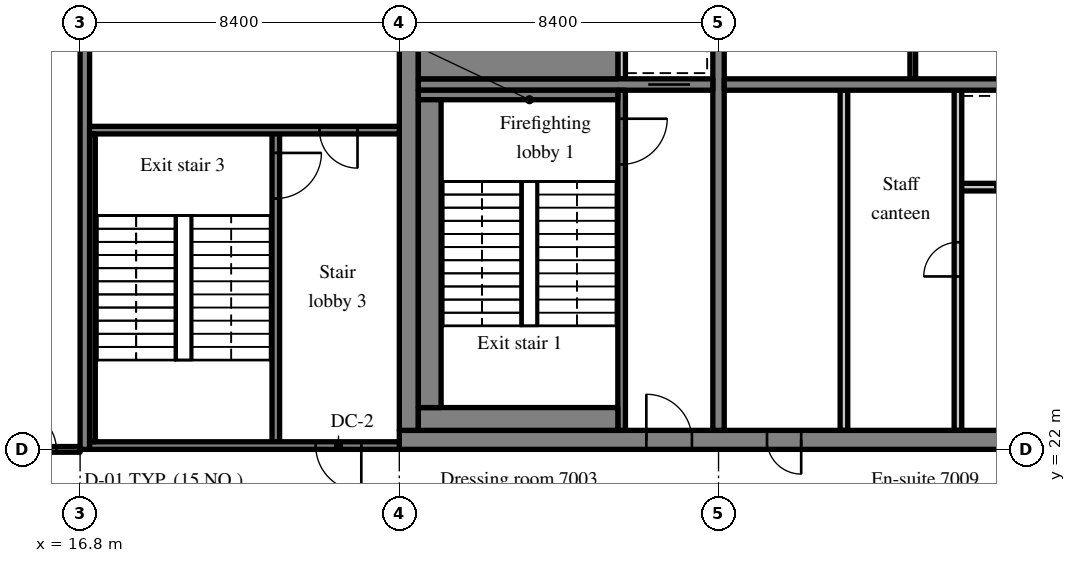
"""IFC4 building model, lengths in metres.
Left out: names, types, materials, properties, quantities, classifications, styles, units other than length and angle.
Written with IfcOpenShell. Run it as: python <this file> out.ifc"""

import sys

from ifc_helpers import new_model, si_unit, direction, frame, frame_2d, origin, place, context, subcontext, project, spatial, rectangle, extrude, source, transform, mapped, element, fill, save


model = new_model("IFC4")
c1 = context("Model", 3, precision=1e-05, world=origin(), true_north=direction((0.0, 1.0)))
c2 = subcontext(c1, "Body", "Model", "MODEL_VIEW")
j1 = project(units=[si_unit("LENGTHUNIT", "METRE"), si_unit("PLANEANGLEUNIT", "RADIAN")], contexts=[c1])
p1 = place(None, origin())
s1 = spatial("IfcSite", under=j1, at=p1, CompositionType="ELEMENT")
p2 = place(p1, origin())
s2 = spatial("IfcBuilding", under=s1, at=p2, CompositionType="ELEMENT")
p3 = place(p2, frame((0.0, 0.0, 293.7)))
s3 = spatial("IfcBuildingStorey", under=s2, at=p3, CompositionType="ELEMENT", Elevation=293.7)
m1 = source(origin(), c2, "Body", "SweptSolid", [
    extrude(rectangle(XDim=50.4, YDim=0.5, at=frame_2d((25.2, 0.0))), origin(), (0.0, 0.0, 1.0), 3.72),
])
p4 = place(p3, frame((25.2, 22.25, 0.0), z_axis=(0.0, 0.0, 1.0), x_axis=(1.0, 0.0, 0.0)))
e1 = element("IfcWall", 1, at=p4, inside=s3, PredefinedType="SHEAR", context=c2, shape_type="MappedRepresentation", body=[
    mapped(m1, transform((0.0, 0.0, 0.0), scale=1.0)),
])
m2 = source(origin(), c2, "Body", "SweptSolid", [
    extrude(rectangle(XDim=1.8, YDim=2.1, at=frame_2d((0.9, 1.05))), frame((0.0, 0.26, 0.0), z_axis=(0.0, -1.0, 0.0), x_axis=(1.0, 0.0, 0.0)), (0.0, 0.0, 1.0), 0.52),
])
p5 = place(p4, frame((15.9, 0.0, 0.0)))
e2 = element("IfcOpeningElement", 2, at=p5, cuts=e1, PredefinedType="OPENING", context=c2, shape_type="MappedRepresentation", body=[
    mapped(m2, transform((0.0, 0.0, 0.0), scale=1.0)),
])
m3 = source(origin(), c2, "Body", "SweptSolid", [
    extrude(rectangle(XDim=0.9, YDim=2.1, at=frame_2d((0.45, 1.05))), frame((0.0, 0.26, 0.0), z_axis=(0.0, -1.0, 0.0), x_axis=(1.0, 0.0, 0.0)), (0.0, 0.0, 1.0), 0.52),
])
p6 = place(p4, frame((9.675, 0.0, 0.0)))
e3 = element("IfcOpeningElement", 3, at=p6, cuts=e1, PredefinedType="OPENING", context=c2, shape_type="MappedRepresentation", body=[
    mapped(m3, transform((0.0, 0.0, 0.0), scale=1.0)),
])
p7 = place(p4, frame((21.525, 0.0, 0.0)))
e4 = element("IfcOpeningElement", 4, at=p7, cuts=e1, PredefinedType="OPENING", context=c2, shape_type="MappedRepresentation", body=[
    mapped(m3, transform((0.0, 0.0, 0.0), scale=1.0)),
])
p8 = place(p4, frame((32.7, 0.0, 0.0)))
e5 = element("IfcOpeningElement", 5, at=p8, cuts=e1, PredefinedType="OPENING", context=c2, shape_type="MappedRepresentation", body=[
    mapped(m2, transform((0.0, 0.0, 0.0), scale=1.0)),
])
m4 = source(origin(), c2, "Body", "SweptSolid", [
    extrude(rectangle(XDim=1.2, YDim=2.1, at=frame_2d((0.6, 1.05))), frame((0.0, 0.26, 0.0), z_axis=(0.0, -1.0, 0.0), x_axis=(1.0, 0.0, 0.0)), (0.0, 0.0, 1.0), 0.52),
])
p9 = place(p4, frame((6.5, 0.0, 0.0)))
e6 = element("IfcOpeningElement", 6, at=p9, cuts=e1, PredefinedType="OPENING", context=c2, shape_type="MappedRepresentation", body=[
    mapped(m4, transform((0.0, 0.0, 0.0), scale=1.0)),
])
p10 = place(p4, frame((47.975, 0.0, 0.0)))
e7 = element("IfcOpeningElement", 7, at=p10, cuts=e1, PredefinedType="OPENING", context=c2, shape_type="MappedRepresentation", body=[
    mapped(m4, transform((0.0, 0.0, 0.0), scale=1.0)),
])
m5 = source(origin(), c2, "Body", "SweptSolid", [
    extrude(rectangle(XDim=19.0, YDim=0.5, at=frame_2d((9.5, 0.0))), origin(), (0.0, 0.0, 1.0), 3.72),
])
p11 = place(p3, frame((25.45, 22.5, 0.0), z_axis=(0.0, 0.0, 1.0), x_axis=(0.0, 1.0, 0.0)))
e8 = element("IfcWall", 8, at=p11, inside=s3, PredefinedType="SHEAR", context=c2, shape_type="MappedRepresentation", body=[
    mapped(m5, transform((0.0, 0.0, 0.0), scale=1.0)),
])
m6 = source(origin(), c2, "Body", "SweptSolid", [
    extrude(rectangle(XDim=19.0, YDim=0.3, at=frame_2d((9.5, 0.0))), origin(), (0.0, 0.0, 1.0), 3.72),
])
p12 = place(p3, frame((33.6, 22.5, 0.0), z_axis=(0.0, 0.0, 1.0), x_axis=(0.0, 1.0, 0.0)))
e9 = element("IfcWall", 9, at=p12, inside=s3, PredefinedType="SHEAR", context=c2, shape_type="MappedRepresentation", body=[
    mapped(m6, transform((0.0, 0.0, 0.0), scale=1.0)),
])
m7 = source(origin(), c2, "Body", "SweptSolid", [
    extrude(rectangle(XDim=1.1, YDim=2.1, at=frame_2d((0.55, 1.05))), frame((0.0, 0.16, 0.0), z_axis=(0.0, -1.0, 0.0), x_axis=(1.0, 0.0, 0.0)), (0.0, 0.0, 1.0), 0.32),
])
p13 = place(p12, frame((12.95, 0.0, 0.0)))
e10 = element("IfcOpeningElement", 10, at=p13, cuts=e9, PredefinedType="OPENING", context=c2, shape_type="MappedRepresentation", body=[
    mapped(m7, transform((0.0, 0.0, 0.0), scale=1.0)),
])
m8 = source(origin(), c2, "Body", "SweptSolid", [
    extrude(rectangle(XDim=7.75, YDim=0.3, at=frame_2d((3.875, 0.0))), origin(), (0.0, 0.0, 1.0), 3.72),
])
p14 = place(p3, frame((25.7, 31.6, 0.0), z_axis=(0.0, 0.0, 1.0), x_axis=(1.0, 0.0, 0.0)))
e11 = element("IfcWall", 11, at=p14, inside=s3, PredefinedType="SHEAR", context=c2, shape_type="MappedRepresentation", body=[
    mapped(m8, transform((0.0, 0.0, 0.0), scale=1.0)),
])
p15 = place(p14, frame((6.05, 0.0, 0.0)))
e12 = element("IfcOpeningElement", 12, at=p15, cuts=e11, PredefinedType="OPENING", context=c2, shape_type="MappedRepresentation", body=[
    mapped(m7, transform((0.0, 0.0, 0.0), scale=1.0)),
])
m9 = source(origin(), c2, "Body", "SweptSolid", [
    extrude(rectangle(XDim=16.5, YDim=0.3, at=frame_2d((8.25, 0.0))), origin(), (0.0, 0.0, 1.0), 3.72),
])
p16 = place(p3, frame((33.75, 31.6, 0.0), z_axis=(0.0, 0.0, 1.0), x_axis=(1.0, 0.0, 0.0)))
e13 = element("IfcWall", 13, at=p16, inside=s3, PredefinedType="SHEAR", context=c2, shape_type="MappedRepresentation", body=[
    mapped(m9, transform((0.0, 0.0, 0.0), scale=1.0)),
])
m10 = source(origin(), c2, "Body", "SweptSolid", [
    extrude(rectangle(XDim=1.0, YDim=2.1, at=frame_2d((0.5, 1.05))), frame((0.0, 0.16, 0.0), z_axis=(0.0, -1.0, 0.0), x_axis=(1.0, 0.0, 0.0)), (0.0, 0.0, 1.0), 0.32),
])
p17 = place(p16, frame((14.875, 0.0, 0.0)))
e14 = element("IfcOpeningElement", 14, at=p17, cuts=e13, PredefinedType="OPENING", context=c2, shape_type="MappedRepresentation", body=[
    mapped(m10, transform((0.0, 0.0, 0.0), scale=1.0)),
])
m11 = source(origin(), c2, "Body", "SweptSolid", [
    extrude(rectangle(XDim=18.4, YDim=0.25, at=frame_2d((9.2, 0.0))), origin(), (0.0, 0.0, 1.0), 3.72),
])
p18 = place(p3, frame((16.925, 22.0, 0.0), z_axis=(0.0, 0.0, 1.0), x_axis=(0.0, 1.0, 0.0)))
e15 = element("IfcWall", 15, at=p18, inside=s3, PredefinedType="SHEAR", context=c2, shape_type="MappedRepresentation", body=[
    mapped(m11, transform((0.0, 0.0, 0.0), scale=1.0)),
])
m12 = source(origin(), c2, "Body", "SweptSolid", [
    extrude(rectangle(XDim=6.0, YDim=0.2, at=frame_2d((3.0, 0.0))), origin(), (0.0, 0.0, 1.0), 3.72),
])
p19 = place(p3, frame((39.9, 28.9, 0.0), z_axis=(0.0, 0.0, 1.0), x_axis=(1.0, 0.0, 0.0)))
e16 = element("IfcWall", 16, at=p19, inside=s3, PredefinedType="SOLIDWALL", context=c2, shape_type="MappedRepresentation", body=[
    mapped(m12, transform((0.0, 0.0, 0.0), scale=1.0)),
])
m13 = source(origin(), c2, "Body", "SweptSolid", [
    extrude(rectangle(XDim=1.1, YDim=2.1, at=frame_2d((0.55, 1.05))), frame((0.0, 0.11, 0.0), z_axis=(0.0, -1.0, 0.0), x_axis=(1.0, 0.0, 0.0)), (0.0, 0.0, 1.0), 0.22),
])
p20 = place(p19, frame((0.95, 0.0, 0.0)))
e17 = element("IfcOpeningElement", 17, at=p20, cuts=e16, PredefinedType="OPENING", context=c2, shape_type="MappedRepresentation", body=[
    mapped(m13, transform((0.0, 0.0, 0.0), scale=1.0)),
])
p21 = place(p19, frame((3.95, 0.0, 0.0)))
e18 = element("IfcOpeningElement", 18, at=p21, cuts=e16, PredefinedType="OPENING", context=c2, shape_type="MappedRepresentation", body=[
    mapped(m13, transform((0.0, 0.0, 0.0), scale=1.0)),
])
m14 = source(origin(), c2, "Body", "SweptSolid", [
    extrude(rectangle(XDim=8.95, YDim=0.2, at=frame_2d((4.475, 0.0))), origin(), (0.0, 0.0, 1.0), 3.72),
])
p22 = place(p3, frame((39.9, 22.5, 0.0), z_axis=(0.0, 0.0, 1.0), x_axis=(0.0, 1.0, 0.0)))
e19 = element("IfcWall", 19, at=p22, inside=s3, PredefinedType="PARTITIONING", context=c2, shape_type="MappedRepresentation", body=[
    mapped(m14, transform((0.0, 0.0, 0.0), scale=1.0)),
])
m15 = source(origin(), c2, "Body", "SweptSolid", [
    extrude(rectangle(XDim=0.9, YDim=2.1, at=frame_2d((0.45, 1.05))), frame((0.0, 0.11, 0.0), z_axis=(0.0, -1.0, 0.0), x_axis=(1.0, 0.0, 0.0)), (0.0, 0.0, 1.0), 0.22),
])
p23 = place(p22, frame((4.05, 0.0, 0.0)))
e20 = element("IfcOpeningElement", 20, at=p23, cuts=e19, PredefinedType="OPENING", context=c2, shape_type="MappedRepresentation", body=[
    mapped(m15, transform((0.0, 0.0, 0.0), scale=1.0)),
])
p24 = place(p3, frame((36.9, 22.5, 0.0), z_axis=(0.0, 0.0, 1.0), x_axis=(0.0, 1.0, 0.0)))
e21 = element("IfcWall", 21, at=p24, inside=s3, PredefinedType="PARTITIONING", context=c2, shape_type="MappedRepresentation", body=[
    mapped(m14, transform((0.0, 0.0, 0.0), scale=1.0)),
])
m16 = source(origin(), c2, "Body", "SweptSolid", [
    extrude(rectangle(XDim=3.25, YDim=0.15, at=frame_2d((1.625, 0.0))), origin(), (0.0, 0.0, 1.0), 3.72),
])
p25 = place(p3, frame((38.711, 31.75, 0.0), z_axis=(0.0, 0.0, 1.0), x_axis=(0.0, 1.0, 0.0)))
e22 = element("IfcWall", 22, at=p25, inside=s3, PredefinedType="PARTITIONING", context=c2, shape_type="MappedRepresentation", body=[
    mapped(m16, transform((0.0, 0.0, 0.0), scale=1.0)),
])
m17 = source(origin(), c2, "Body", "SweptSolid", [
    extrude(rectangle(XDim=8.95, YDim=0.2, at=frame_2d((4.475, 0.0))), origin(), (0.0, 0.0, 1.0), 3.72),
])
p26 = place(p3, frame((31.05, 22.5, 0.0), z_axis=(0.0, 0.0, 1.0), x_axis=(0.0, 1.0, 0.0)))
e23 = element("IfcWall", 23, at=p26, inside=s3, PredefinedType="SOLIDWALL", context=c2, shape_type="MappedRepresentation", body=[
    mapped(m17, transform((0.0, 0.0, 0.0), scale=1.0)),
])
m18 = source(origin(), c2, "Body", "SweptSolid", [
    extrude(rectangle(XDim=1.2, YDim=2.1, at=frame_2d((0.6, 1.05))), frame((0.0, 0.11, 0.0), z_axis=(0.0, -1.0, 0.0), x_axis=(1.0, 0.0, 0.0)), (0.0, 0.0, 1.0), 0.22),
])
p27 = place(p26, frame((7.0, 0.0, 0.0)))
e24 = element("IfcOpeningElement", 24, at=p27, cuts=e23, PredefinedType="OPENING", context=c2, shape_type="MappedRepresentation", body=[
    mapped(m18, transform((0.0, 0.0, 0.0), scale=1.0)),
])
m19 = source(origin(), c2, "Body", "SweptSolid", [
    extrude(rectangle(XDim=1.85, YDim=0.2, at=frame_2d((0.925, 0.0))), origin(), (0.0, 0.0, 1.0), 3.72),
])
p28 = place(p3, frame((31.05, 31.75, 0.0), z_axis=(0.0, 0.0, 1.0), x_axis=(0.0, 1.0, 0.0)))
e25 = element("IfcWall", 25, at=p28, inside=s3, PredefinedType="SOLIDWALL", context=c2, shape_type="MappedRepresentation", body=[
    mapped(m19, transform((0.0, 0.0, 0.0), scale=1.0)),
])
m20 = source(origin(), c2, "Body", "SweptSolid", [
    extrude(rectangle(XDim=8.3, YDim=0.2, at=frame_2d((4.15, 0.0))), origin(), (0.0, 0.0, 1.0), 3.72),
])
p29 = place(p3, frame((21.95, 22.1, 0.0), z_axis=(0.0, 0.0, 1.0), x_axis=(0.0, 1.0, 0.0)))
e26 = element("IfcWall", 26, at=p29, inside=s3, PredefinedType="SOLIDWALL", context=c2, shape_type="MappedRepresentation", body=[
    mapped(m20, transform((0.0, 0.0, 0.0), scale=1.0)),
])
p30 = place(p29, frame((6.5, 0.0, 0.0)))
e27 = element("IfcOpeningElement", 27, at=p30, cuts=e26, PredefinedType="OPENING", context=c2, shape_type="MappedRepresentation", body=[
    mapped(m18, transform((0.0, 0.0, 0.0), scale=1.0)),
])
m21 = source(origin(), c2, "Body", "SweptSolid", [
    extrude(rectangle(XDim=8.15, YDim=0.2, at=frame_2d((4.075, 0.0))), origin(), (0.0, 0.0, 1.0), 3.72),
])
p31 = place(p3, frame((17.05, 22.1, 0.0), z_axis=(0.0, 0.0, 1.0), x_axis=(1.0, 0.0, 0.0)))
e28 = element("IfcWall", 28, at=p31, inside=s3, PredefinedType="SOLIDWALL", context=c2, shape_type="MappedRepresentation", body=[
    mapped(m21, transform((0.0, 0.0, 0.0), scale=1.0)),
])
p32 = place(p31, frame((5.95, 0.0, 0.0)))
e29 = element("IfcOpeningElement", 29, at=p32, cuts=e28, PredefinedType="OPENING", context=c2, shape_type="MappedRepresentation", body=[
    mapped(m18, transform((0.0, 0.0, 0.0), scale=1.0)),
])
p33 = place(p3, frame((17.05, 30.4, 0.0), z_axis=(0.0, 0.0, 1.0), x_axis=(1.0, 0.0, 0.0)))
e30 = element("IfcWall", 30, at=p33, inside=s3, PredefinedType="SOLIDWALL", context=c2, shape_type="MappedRepresentation", body=[
    mapped(m21, transform((0.0, 0.0, 0.0), scale=1.0)),
])
m22 = source(origin(), c2, "Body", "SweptSolid", [
    extrude(rectangle(XDim=1.0, YDim=2.1, at=frame_2d((0.5, 1.05))), frame((0.0, 0.11, 0.0), z_axis=(0.0, -1.0, 0.0), x_axis=(1.0, 0.0, 0.0)), (0.0, 0.0, 1.0), 0.22),
])
p34 = place(p33, frame((6.05, 0.0, 0.0)))
e31 = element("IfcOpeningElement", 31, at=p34, cuts=e30, PredefinedType="OPENING", context=c2, shape_type="MappedRepresentation", body=[
    mapped(m22, transform((0.0, 0.0, 0.0), scale=1.0)),
])
m23 = source(origin(), c2, "Body", "SweptSolid", [
    extrude(rectangle(XDim=5.25, YDim=0.6, at=frame_2d((2.625, 0.0))), origin(), (0.0, 0.0, 1.0), 3.72),
])
p35 = place(p3, frame((25.7, 22.8, 0.0), z_axis=(0.0, 0.0, 1.0), x_axis=(1.0, 0.0, 0.0)))
e32 = element("IfcWall", 32, at=p35, inside=s3, PredefinedType="SOLIDWALL", context=c2, shape_type="MappedRepresentation", body=[
    mapped(m23, transform((0.0, 0.0, 0.0), scale=1.0)),
])
m24 = source(origin(), c2, "Body", "SweptSolid", [
    extrude(rectangle(XDim=5.25, YDim=0.25, at=frame_2d((2.625, 0.0))), origin(), (0.0, 0.0, 1.0), 3.72),
])
p36 = place(p3, frame((25.7, 31.325, 0.0), z_axis=(0.0, 0.0, 1.0), x_axis=(1.0, 0.0, 0.0)))
e33 = element("IfcWall", 33, at=p36, inside=s3, PredefinedType="SOLIDWALL", context=c2, shape_type="MappedRepresentation", body=[
    mapped(m24, transform((0.0, 0.0, 0.0), scale=1.0)),
])
m25 = source(origin(), c2, "Body", "SweptSolid", [
    extrude(rectangle(XDim=8.1, YDim=0.6, at=frame_2d((4.05, 0.0))), origin(), (0.0, 0.0, 1.0), 3.72),
])
p37 = place(p3, frame((26.0, 23.1, 0.0), z_axis=(0.0, 0.0, 1.0), x_axis=(0.0, 1.0, 0.0)))
e34 = element("IfcWall", 34, at=p37, inside=s3, PredefinedType="SOLIDWALL", context=c2, shape_type="MappedRepresentation", body=[
    mapped(m25, transform((0.0, 0.0, 0.0), scale=1.0)),
])
m26 = source(origin(), c2, "Body", "SweptSolid", [
    extrude(rectangle(XDim=8.1, YDim=0.15, at=frame_2d((4.05, 0.0))), origin(), (0.0, 0.0, 1.0), 3.72),
])
p38 = place(p3, frame((17.125, 22.2, 0.0), z_axis=(0.0, 0.0, 1.0), x_axis=(0.0, 1.0, 0.0)))
e35 = element("IfcWall", 35, at=p38, inside=s3, PredefinedType="SOLIDWALL", context=c2, shape_type="MappedRepresentation", body=[
    mapped(m26, transform((0.0, 0.0, 0.0), scale=1.0)),
])
m27 = source(origin(), c2, "Body", "SweptSolid", [
    extrude(rectangle(XDim=5.25, YDim=1.05, at=frame_2d((2.625, 0.0))), origin(), (0.0, 0.0, 1.0), 3.72),
])
p39 = place(p3, frame((25.7, 32.275, 0.0), z_axis=(0.0, 0.0, 1.0), x_axis=(1.0, 0.0, 0.0)))
e36 = element("IfcWall", 36, at=p39, inside=s3, PredefinedType="SOLIDWALL", context=c2, shape_type="MappedRepresentation", body=[
    mapped(m27, transform((0.0, 0.0, 0.0), scale=1.0)),
])
m28 = source(origin(), c2, "Body", "SweptSolid", [
    extrude(rectangle(XDim=1.9, YDim=0.15, at=frame_2d((0.95, 0.0))), origin(), (0.0, 0.0, 1.0), 3.02),
])
p40 = place(p3, frame((14.9, 22.0, 0.0), z_axis=(0.0, 0.0, 1.0), x_axis=(1.0, 0.0, 0.0)))
e37 = element("IfcWall", 37, at=p40, inside=s3, PredefinedType="PARTITIONING", context=c2, shape_type="MappedRepresentation", body=[
    mapped(m28, transform((0.0, 0.0, 0.0), scale=1.0)),
])
m29 = source(origin(), c2, "Body", "SweptSolid", [
    extrude(rectangle(XDim=1.0, YDim=2.1, at=frame_2d((0.5, 1.05))), frame((0.0, 0.085, 0.0), z_axis=(0.0, -1.0, 0.0), x_axis=(1.0, 0.0, 0.0)), (0.0, 0.0, 1.0), 0.17),
])
p41 = place(p40, frame((0.275, 0.0, 0.0)))
e38 = element("IfcOpeningElement", 38, at=p41, cuts=e37, PredefinedType="OPENING", context=c2, shape_type="MappedRepresentation", body=[
    mapped(m29, transform((0.0, 0.0, 0.0), scale=1.0)),
])
m30 = source(origin(), c2, "Body", "SweptSolid", [
    extrude(rectangle(XDim=1.1, YDim=2.1, at=frame_2d((0.55, 1.05))), frame((0.0, 0.025, 0.0), z_axis=(0.0, -1.0, 0.0), x_axis=(1.0, 0.0, 0.0)), (0.0, 0.0, 1.0), 0.05),
])
p42 = place(p20, origin())
e39 = element("IfcDoor", 39, at=p42, inside=s3, OperationType="SLIDING_TO_LEFT", PredefinedType="DOOR", context=c2, shape_type="MappedRepresentation", body=[
    mapped(m30, transform((0.0, 0.0, 0.0), scale=1.0)),
])
fill(e17, e39)
m31 = source(origin(), c2, "Body", "SweptSolid", [
    extrude(rectangle(XDim=0.9, YDim=2.1, at=frame_2d((0.45, 1.05))), frame((0.0, 0.175, 0.0), z_axis=(0.0, -1.0, 0.0), x_axis=(1.0, 0.0, 0.0)), (0.0, 0.0, 1.0), 0.05),
])
p43 = place(p6, origin())
e40 = element("IfcDoor", 40, at=p43, inside=s3, OperationType="SINGLE_SWING_RIGHT", PredefinedType="DOOR", context=c2, shape_type="MappedRepresentation", body=[
    mapped(m31, transform((0.0, 0.0, 0.0), scale=1.0)),
])
fill(e3, e40)
m32 = source(origin(), c2, "Body", "SweptSolid", [
    extrude(rectangle(XDim=0.9, YDim=2.1, at=frame_2d((0.45, 1.05))), frame((0.0, 0.025, 0.0), z_axis=(0.0, -1.0, 0.0), x_axis=(1.0, 0.0, 0.0)), (0.0, 0.0, 1.0), 0.05),
])
p44 = place(p23, origin())
e41 = element("IfcDoor", 41, at=p44, inside=s3, OperationType="SINGLE_SWING_LEFT", PredefinedType="DOOR", context=c2, shape_type="MappedRepresentation", body=[
    mapped(m32, transform((0.0, 0.0, 0.0), scale=1.0)),
])
fill(e20, e41)
m33 = source(origin(), c2, "Body", "SweptSolid", [
    extrude(rectangle(XDim=1.2, YDim=2.1, at=frame_2d((0.6, 1.05))), frame((0.0, 0.025, 0.0), z_axis=(0.0, -1.0, 0.0), x_axis=(1.0, 0.0, 0.0)), (0.0, 0.0, 1.0), 0.05),
])
p45 = place(p27, origin())
e42 = element("IfcDoor", 42, at=p45, inside=s3, OperationType="SINGLE_SWING_RIGHT", PredefinedType="DOOR", context=c2, shape_type="MappedRepresentation", body=[
    mapped(m33, transform((0.0, 0.0, 0.0), scale=1.0)),
])
fill(e24, e42)
m34 = source(origin(), c2, "Body", "SweptSolid", [
    extrude(rectangle(XDim=1.2, YDim=2.1, at=frame_2d((0.6, 1.05))), frame((0.0, 0.175, 0.0), z_axis=(0.0, -1.0, 0.0), x_axis=(1.0, 0.0, 0.0)), (0.0, 0.0, 1.0), 0.05),
])
p46 = place(p9, origin())
e43 = element("IfcDoor", 43, at=p46, inside=s3, OperationType="SINGLE_SWING_LEFT", PredefinedType="DOOR", context=c2, shape_type="MappedRepresentation", body=[
    mapped(m34, transform((0.0, 0.0, 0.0), scale=1.0)),
])
fill(e6, e43)
p47 = place(p15, origin())
e44 = element("IfcDoor", 44, at=p47, inside=s3, OperationType="SLIDING_TO_LEFT", PredefinedType="DOOR", context=c2, shape_type="MappedRepresentation", body=[
    mapped(m30, transform((0.0, 0.0, 0.0), scale=1.0)),
])
fill(e12, e44)
p48 = place(p30, origin())
e45 = element("IfcDoor", 45, at=p48, inside=s3, OperationType="SINGLE_SWING_RIGHT", PredefinedType="DOOR", context=c2, shape_type="MappedRepresentation", body=[
    mapped(m33, transform((0.0, 0.0, 0.0), scale=1.0)),
])
fill(e27, e45)
p49 = place(p32, origin())
e46 = element("IfcDoor", 46, at=p49, inside=s3, OperationType="SINGLE_SWING_RIGHT", PredefinedType="DOOR", context=c2, shape_type="MappedRepresentation", body=[
    mapped(m33, transform((0.0, 0.0, 0.0), scale=1.0)),
])
fill(e29, e46)
m35 = source(origin(), c2, "Body", "SweptSolid", [
    extrude(rectangle(XDim=1.0, YDim=2.1, at=frame_2d((0.5, 1.05))), frame((0.0, 0.025, 0.0), z_axis=(0.0, -1.0, 0.0), x_axis=(1.0, 0.0, 0.0)), (0.0, 0.0, 1.0), 0.05),
])
p50 = place(p34, origin())
e47 = element("IfcDoor", 47, at=p50, inside=s3, OperationType="SINGLE_SWING_RIGHT", PredefinedType="DOOR", context=c2, shape_type="MappedRepresentation", body=[
    mapped(m35, transform((0.0, 0.0, 0.0), scale=1.0)),
])
fill(e31, e47)
p51 = place(p41, origin())
e48 = element("IfcDoor", 48, at=p51, inside=s3, OperationType="SINGLE_SWING_LEFT", PredefinedType="DOOR", context=c2, shape_type="MappedRepresentation", body=[
    mapped(m35, transform((0.0, 0.0, 0.0), scale=1.0)),
])
fill(e38, e48)
save(model, sys.argv[1])
